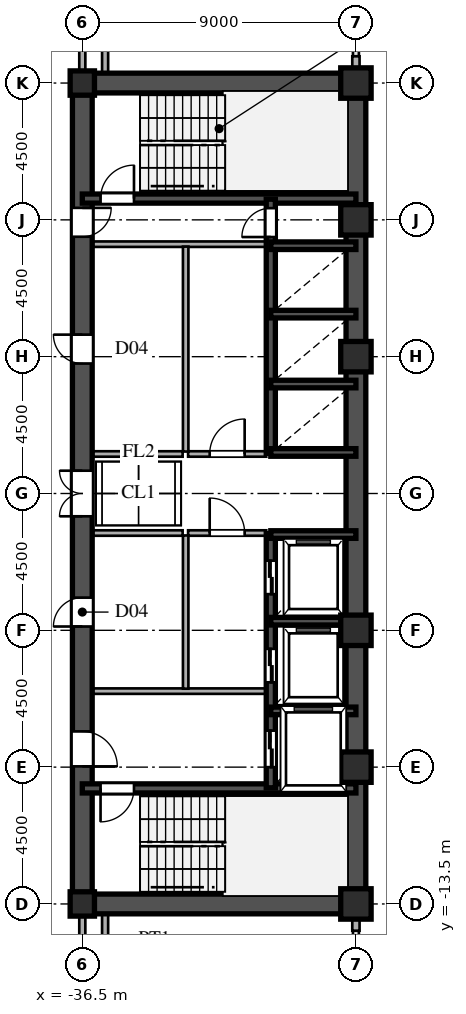
"""IFC4 building model, lengths in metres.
Left out: names, types, materials, properties, quantities, classifications, styles, units other than length and angle.
Written with IfcOpenShell. Run it as: python <this file> out.ifc"""

import sys

from ifc_helpers import new_model, si_unit, direction, frame, frame_2d, origin, origin_2d, place, context, subcontext, project, spatial, rectangle, hollow_rectangle, i_section, extrude, source, transform, mapped, element, fill, save


model = new_model("IFC4")
c1 = context("Model", 3, precision=1e-05, world=origin(), true_north=direction((0.0, 1.0)))
c2 = subcontext(c1, "Body", "Model", "MODEL_VIEW")
j1 = project(units=[si_unit("LENGTHUNIT", "METRE"), si_unit("PLANEANGLEUNIT", "RADIAN")], contexts=[c1])
p1 = place(None, origin())
s1 = spatial("IfcSite", under=j1, at=p1, CompositionType="ELEMENT")
p2 = place(p1, origin())
s2 = spatial("IfcBuilding", under=s1, at=p2, CompositionType="ELEMENT")
p3 = place(p2, frame((0.0, 0.0, 106.8)))
s3 = spatial("IfcBuildingStorey", under=s2, at=p3, CompositionType="ELEMENT", Elevation=106.8)
m1 = source(origin(), c2, "Body", "SweptSolid", [
    extrude(hollow_rectangle(XDim=1.0, YDim=1.0, WallThickness=0.042, at=origin_2d()), origin(), (0.0, 0.0, 1.0), 3.6),
])
for number, where, z_axis, x_axis in (
    (1, (-27.5, -13.5, 0.0), (0.0, 0.0, 1.0), (1.0, 0.0, 0.0)),
    (2, (-27.5, -9.0, 0.0), (0.0, 0.0, 1.0), (1.0, 0.0, 0.0)),
    (3, (-27.5, -4.5, 0.0), (0.0, 0.0, 1.0), (1.0, 0.0, 0.0)),
    (4, (-27.5, 4.5, 0.0), (0.0, 0.0, 1.0), (1.0, 0.0, 0.0)),
    (5, (-27.5, 9.0, 0.0), (0.0, 0.0, 1.0), (1.0, 0.0, 0.0)),
    (6, (-27.5, 13.5, 0.0), (0.0, 0.0, 1.0), (1.0, 0.0, 0.0)),
):
    element("IfcColumn", number, at=place(p3, frame(where, z_axis=z_axis, x_axis=x_axis)), inside=s3, PredefinedType="COLUMN", context=c2, shape_type="MappedRepresentation", body=[
        mapped(m1, transform((0.0, 0.0, 0.0), scale=1.0)),
    ])
m2 = source(origin(), c2, "Body", "SweptSolid", [
    extrude(i_section(OverallWidth=0.8, OverallDepth=0.8, WebThickness=0.032, FlangeThickness=0.05, at=origin_2d()), origin(), (0.0, 0.0, 1.0), 3.6),
])
for number, where, z_axis, x_axis in (
    (7, (-36.5, -13.5, 0.0), (0.0, 0.0, 1.0), (1.0, 0.0, 0.0)),
    (8, (-36.5, 13.5, 0.0), (0.0, 0.0, 1.0), (1.0, 0.0, 0.0)),
):
    element("IfcColumn", number, at=place(p3, frame(where, z_axis=z_axis, x_axis=x_axis)), inside=s3, PredefinedType="COLUMN", context=c2, shape_type="MappedRepresentation", body=[
        mapped(m2, transform((0.0, 0.0, 0.0), scale=1.0)),
    ])
for number, where, z_axis, x_axis in (
    (9, (-27.5, -14.38, 0.0), (0.0, 0.0, 1.0), (0.0, 1.0, 0.0)),
    (10, (-27.5, 13.83, 0.0), (0.0, 0.0, 1.0), (0.0, 1.0, 0.0)),
):
    element("IfcWall", number, at=place(p3, frame(where, z_axis=z_axis, x_axis=x_axis)), inside=s3, PredefinedType="SOLIDWALL", context=c2, shape_type="SweptSolid", body=[
        extrude(rectangle(XDim=0.55, YDim=0.24, at=frame_2d((0.275, 0.0))), origin(), (0.0, 0.0, 1.0), 1.88),
    ])
for number, where, z_axis, x_axis in (
    (11, (-27.5, -13.5, 0.0), (0.0, 0.0, 1.0), (0.0, 1.0, 0.0)),
    (12, (-27.5, 1.3, 0.0), (0.0, 0.0, 1.0), (0.0, 1.0, 0.0)),
):
    element("IfcWall", number, at=place(p3, frame(where, z_axis=z_axis, x_axis=x_axis)), inside=s3, PredefinedType="SHEAR", context=c2, shape_type="SweptSolid", body=[
        extrude(rectangle(XDim=12.2, YDim=0.65, at=frame_2d((6.1, 0.0))), origin(), (0.0, 0.0, 1.0), 3.38),
    ])
p4 = place(p3, frame((-27.5, -1.3, 0.0), z_axis=(0.0, 0.0, 1.0), x_axis=(0.0, 1.0, 0.0)))
e13 = element("IfcWall", 13, at=p4, inside=s3, PredefinedType="SHEAR", context=c2, shape_type="SweptSolid", body=[
    extrude(rectangle(XDim=2.6, YDim=0.65, at=frame_2d((1.3, 0.0))), origin(), (0.0, 0.0, 1.0), 3.38),
])
for number, where, z_axis, x_axis in (
    (14, (-36.5, -13.5, 0.0), (0.0, 0.0, 1.0), (1.0, 0.0, 0.0)),
    (15, (-36.5, 13.5, 0.0), (0.0, 0.0, 1.0), (1.0, 0.0, 0.0)),
):
    element("IfcWall", number, at=place(p3, frame(where, z_axis=z_axis, x_axis=x_axis)), inside=s3, PredefinedType="SHEAR", context=c2, shape_type="SweptSolid", body=[
        extrude(rectangle(XDim=9.0, YDim=0.65, at=frame_2d((4.5, 0.0))), origin(), (0.0, 0.0, 1.0), 3.38),
    ])
p5 = place(p3, frame((-36.5, -13.65, 0.0), z_axis=(0.0, 0.0, 1.0), x_axis=(0.0, 1.0, 0.0)))
e16 = element("IfcWall", 16, at=p5, inside=s3, PredefinedType="SHEAR", context=c2, shape_type="SweptSolid", body=[
    extrude(rectangle(XDim=7.15, YDim=0.65, at=frame_2d((3.575, 0.0))), origin(), (0.0, 0.0, 1.0), 3.38),
])
p6 = place(p5, frame((4.675, 0.0, 0.0)))
e17 = element("IfcOpeningElement", 17, at=p6, cuts=e16, PredefinedType="OPENING", context=c2, shape_type="SweptSolid", body=[
    extrude(rectangle(XDim=1.15, YDim=2.2, at=frame_2d((0.575, 1.1))), frame((0.0, 0.335, 0.0), z_axis=(0.0, -1.0, 0.0), x_axis=(1.0, 0.0, 0.0)), (0.0, 0.0, 1.0), 0.67),
])
p7 = place(p3, frame((-36.5, -1.3, 0.0), z_axis=(0.0, 0.0, 1.0), x_axis=(0.0, 1.0, 0.0)))
e18 = element("IfcWall", 18, at=p7, inside=s3, PredefinedType="SHEAR", context=c2, shape_type="SweptSolid", body=[
    extrude(rectangle(XDim=2.6, YDim=0.65, at=frame_2d((1.3, 0.0))), origin(), (0.0, 0.0, 1.0), 3.38),
])
p8 = place(p7, frame((0.55, 0.0, 0.0)))
e19 = element("IfcOpeningElement", 19, at=p8, cuts=e18, PredefinedType="OPENING", context=c2, shape_type="SweptSolid", body=[
    extrude(rectangle(XDim=1.5, YDim=2.3, at=frame_2d((0.75, 1.15))), frame((0.0, 0.335, 0.0), z_axis=(0.0, -1.0, 0.0), x_axis=(1.0, 0.0, 0.0)), (0.0, 0.0, 1.0), 0.67),
])
p9 = place(p3, frame((-36.5, 8.2, 0.0), z_axis=(0.0, 0.0, 1.0), x_axis=(0.0, 1.0, 0.0)))
e20 = element("IfcWall", 20, at=p9, inside=s3, PredefinedType="SHEAR", context=c2, shape_type="SweptSolid", body=[
    extrude(rectangle(XDim=5.45, YDim=0.65, at=frame_2d((2.725, 0.0))), origin(), (0.0, 0.0, 1.0), 3.38),
])
p10 = place(p9, frame((0.245, 0.0, 0.0)))
e21 = element("IfcOpeningElement", 21, at=p10, cuts=e20, PredefinedType="OPENING", context=c2, shape_type="SweptSolid", body=[
    extrude(rectangle(XDim=0.95, YDim=2.15, at=frame_2d((0.475, 1.075))), frame((0.0, 0.335, 0.0), z_axis=(0.0, -1.0, 0.0), x_axis=(1.0, 0.0, 0.0)), (0.0, 0.0, 1.0), 0.67),
])
p11 = place(p3, frame((-36.5, -6.5, 0.0), z_axis=(0.0, 0.0, 1.0), x_axis=(0.0, 1.0, 0.0)))
e22 = element("IfcWall", 22, at=p11, inside=s3, PredefinedType="SHEAR", context=c2, shape_type="SweptSolid", body=[
    extrude(rectangle(XDim=5.2, YDim=0.65, at=frame_2d((2.6, 0.0))), origin(), (0.0, 0.0, 1.0), 3.38),
])
p12 = place(p11, frame((2.125, 0.0, 0.0)))
e23 = element("IfcOpeningElement", 23, at=p12, cuts=e22, PredefinedType="OPENING", context=c2, shape_type="SweptSolid", body=[
    extrude(rectangle(XDim=0.95, YDim=2.15, at=frame_2d((0.475, 1.075))), frame((0.0, 0.335, 0.0), z_axis=(0.0, -1.0, 0.0), x_axis=(1.0, 0.0, 0.0)), (0.0, 0.0, 1.0), 0.67),
])
p13 = place(p3, frame((-36.5, 1.3, 0.0), z_axis=(0.0, 0.0, 1.0), x_axis=(0.0, 1.0, 0.0)))
e24 = element("IfcWall", 24, at=p13, inside=s3, PredefinedType="SHEAR", context=c2, shape_type="SweptSolid", body=[
    extrude(rectangle(XDim=6.9, YDim=0.65, at=frame_2d((3.45, 0.0))), origin(), (0.0, 0.0, 1.0), 3.38),
])
p14 = place(p13, frame((2.975, 0.0, 0.0)))
e25 = element("IfcOpeningElement", 25, at=p14, cuts=e24, PredefinedType="OPENING", context=c2, shape_type="SweptSolid", body=[
    extrude(rectangle(XDim=0.95, YDim=2.15, at=frame_2d((0.475, 1.075))), frame((0.0, 0.335, 0.0), z_axis=(0.0, -1.0, 0.0), x_axis=(1.0, 0.0, 0.0)), (0.0, 0.0, 1.0), 0.67),
])
p15 = place(p3, frame((-36.5, -9.7, 0.0), z_axis=(0.0, 0.0, 1.0), x_axis=(1.0, 0.0, 0.0)))
e26 = element("IfcWall", 26, at=p15, inside=s3, PredefinedType="SHEAR", context=c2, shape_type="SweptSolid", body=[
    extrude(rectangle(XDim=9.0, YDim=0.3, at=frame_2d((4.5, 0.0))), origin(), (0.0, 0.0, 1.0), 3.38),
])
p16 = place(p15, frame((0.6, 0.0, 0.0)))
e27 = element("IfcOpeningElement", 27, at=p16, cuts=e26, PredefinedType="OPENING", context=c2, shape_type="SweptSolid", body=[
    extrude(rectangle(XDim=1.1, YDim=2.2, at=frame_2d((0.55, 1.1))), frame((0.0, 0.16, 0.0), z_axis=(0.0, -1.0, 0.0), x_axis=(1.0, 0.0, 0.0)), (0.0, 0.0, 1.0), 0.32),
])
p17 = place(p3, frame((-36.5, 9.7, 0.0), z_axis=(0.0, 0.0, 1.0), x_axis=(1.0, 0.0, 0.0)))
e28 = element("IfcWall", 28, at=p17, inside=s3, PredefinedType="SHEAR", context=c2, shape_type="SweptSolid", body=[
    extrude(rectangle(XDim=9.0, YDim=0.3, at=frame_2d((4.5, 0.0))), origin(), (0.0, 0.0, 1.0), 3.38),
])
p18 = place(p17, frame((0.6, 0.0, 0.0)))
e29 = element("IfcOpeningElement", 29, at=p18, cuts=e28, PredefinedType="OPENING", context=c2, shape_type="SweptSolid", body=[
    extrude(rectangle(XDim=1.1, YDim=2.2, at=frame_2d((0.55, 1.1))), frame((0.0, 0.16, 0.0), z_axis=(0.0, -1.0, 0.0), x_axis=(1.0, 0.0, 0.0)), (0.0, 0.0, 1.0), 0.32),
])
for number, where, z_axis, x_axis in (
    (30, (-30.3, -7.15, 0.0), (0.0, 0.0, 1.0), (1.0, 0.0, 0.0)),
    (31, (-30.3, -4.2, 0.0), (0.0, 0.0, 1.0), (1.0, 0.0, 0.0)),
    (32, (-30.3, -1.35, 0.0), (0.0, 0.0, 1.0), (1.0, 0.0, 0.0)),
    (33, (-30.3, 1.35, 0.0), (0.0, 0.0, 1.0), (1.0, 0.0, 0.0)),
    (34, (-30.3, 3.6, 0.0), (0.0, 0.0, 1.0), (1.0, 0.0, 0.0)),
    (35, (-30.3, 5.9, 0.0), (0.0, 0.0, 1.0), (1.0, 0.0, 0.0)),
    (36, (-30.3, 8.15, 0.0), (0.0, 0.0, 1.0), (1.0, 0.0, 0.0)),
):
    element("IfcWall", number, at=place(p3, frame(where, z_axis=z_axis, x_axis=x_axis)), inside=s3, PredefinedType="SHEAR", context=c2, shape_type="SweptSolid", body=[
        extrude(rectangle(XDim=2.8, YDim=0.25, at=frame_2d((1.4, 0.0))), origin(), (0.0, 0.0, 1.0), 3.38),
    ])
p19 = place(p3, frame((-30.3, -9.68, 0.0), z_axis=(0.0, 0.0, 1.0), x_axis=(0.0, 1.0, 0.0)))
e37 = element("IfcWall", 37, at=p19, inside=s3, PredefinedType="SHEAR", context=c2, shape_type="SweptSolid", body=[
    extrude(rectangle(XDim=2.56, YDim=0.3, at=frame_2d((1.28, 0.0))), origin(), (0.0, 0.0, 1.0), 3.38),
])
p20 = place(p19, frame((0.68, 0.0, 0.0)))
e38 = element("IfcOpeningElement", 38, at=p20, cuts=e37, PredefinedType="OPENING", context=c2, shape_type="SweptSolid", body=[
    extrude(rectangle(XDim=1.2, YDim=2.25, at=frame_2d((0.6, 1.125))), frame((0.0, 0.16, 0.0), z_axis=(0.0, -1.0, 0.0), x_axis=(1.0, 0.0, 0.0)), (0.0, 0.0, 1.0), 0.32),
])
p21 = place(p3, frame((-30.3, -7.12, 0.0), z_axis=(0.0, 0.0, 1.0), x_axis=(0.0, 1.0, 0.0)))
e39 = element("IfcWall", 39, at=p21, inside=s3, PredefinedType="SHEAR", context=c2, shape_type="SweptSolid", body=[
    extrude(rectangle(XDim=2.92, YDim=0.3, at=frame_2d((1.46, 0.0))), origin(), (0.0, 0.0, 1.0), 3.38),
])
p22 = place(p21, frame((0.91, 0.0, 0.0)))
e40 = element("IfcOpeningElement", 40, at=p22, cuts=e39, PredefinedType="OPENING", context=c2, shape_type="SweptSolid", body=[
    extrude(rectangle(XDim=1.1, YDim=2.2, at=frame_2d((0.55, 1.1))), frame((0.0, 0.16, 0.0), z_axis=(0.0, -1.0, 0.0), x_axis=(1.0, 0.0, 0.0)), (0.0, 0.0, 1.0), 0.32),
])
p23 = place(p3, frame((-30.3, -4.2, 0.0), z_axis=(0.0, 0.0, 1.0), x_axis=(0.0, 1.0, 0.0)))
e41 = element("IfcWall", 41, at=p23, inside=s3, PredefinedType="SHEAR", context=c2, shape_type="SweptSolid", body=[
    extrude(rectangle(XDim=2.88, YDim=0.3, at=frame_2d((1.44, 0.0))), origin(), (0.0, 0.0, 1.0), 3.38),
])
p24 = place(p23, frame((0.89, 0.0, 0.0)))
e42 = element("IfcOpeningElement", 42, at=p24, cuts=e41, PredefinedType="OPENING", context=c2, shape_type="SweptSolid", body=[
    extrude(rectangle(XDim=1.1, YDim=2.2, at=frame_2d((0.55, 1.1))), frame((0.0, 0.16, 0.0), z_axis=(0.0, -1.0, 0.0), x_axis=(1.0, 0.0, 0.0)), (0.0, 0.0, 1.0), 0.32),
])
p25 = place(p3, frame((-30.3, 1.32, 0.0), z_axis=(0.0, 0.0, 1.0), x_axis=(0.0, 1.0, 0.0)))
e43 = element("IfcWall", 43, at=p25, inside=s3, PredefinedType="SHEAR", context=c2, shape_type="SweptSolid", body=[
    extrude(rectangle(XDim=2.28, YDim=0.3, at=frame_2d((1.14, 0.0))), origin(), (0.0, 0.0, 1.0), 3.38),
])
p26 = place(p3, frame((-30.3, 3.6, 0.0), z_axis=(0.0, 0.0, 1.0), x_axis=(0.0, 1.0, 0.0)))
e44 = element("IfcWall", 44, at=p26, inside=s3, PredefinedType="SHEAR", context=c2, shape_type="SweptSolid", body=[
    extrude(rectangle(XDim=2.3, YDim=0.3, at=frame_2d((1.15, 0.0))), origin(), (0.0, 0.0, 1.0), 3.38),
])
p27 = place(p3, frame((-30.3, 5.9, 0.0), z_axis=(0.0, 0.0, 1.0), x_axis=(0.0, 1.0, 0.0)))
e45 = element("IfcWall", 45, at=p27, inside=s3, PredefinedType="SHEAR", context=c2, shape_type="SweptSolid", body=[
    extrude(rectangle(XDim=2.25, YDim=0.3, at=frame_2d((1.125, 0.0))), origin(), (0.0, 0.0, 1.0), 3.38),
])
p28 = place(p3, frame((-30.3, 8.15, 0.0), z_axis=(0.0, 0.0, 1.0), x_axis=(0.0, 1.0, 0.0)))
e46 = element("IfcWall", 46, at=p28, inside=s3, PredefinedType="SHEAR", context=c2, shape_type="SweptSolid", body=[
    extrude(rectangle(XDim=1.53, YDim=0.3, at=frame_2d((0.765, 0.0))), origin(), (0.0, 0.0, 1.0), 3.38),
])
p29 = place(p28, frame((0.285, 0.0, 0.0)))
e47 = element("IfcOpeningElement", 47, at=p29, cuts=e46, PredefinedType="OPENING", context=c2, shape_type="SweptSolid", body=[
    extrude(rectangle(XDim=0.95, YDim=2.15, at=frame_2d((0.475, 1.075))), frame((0.0, 0.16, 0.0), z_axis=(0.0, -1.0, 0.0), x_axis=(1.0, 0.0, 0.0)), (0.0, 0.0, 1.0), 0.32),
])
for number, where, z_axis, x_axis in (
    (48, (-36.15, -6.5, 0.0), (0.0, 0.0, 1.0), (1.0, 0.0, 0.0)),
    (49, (-36.15, 8.2, 0.0), (0.0, 0.0, 1.0), (1.0, 0.0, 0.0)),
):
    element("IfcWall", number, at=place(p3, frame(where, z_axis=z_axis, x_axis=x_axis)), inside=s3, PredefinedType="PARTITIONING", context=c2, shape_type="SweptSolid", body=[
        extrude(rectangle(XDim=5.7, YDim=0.18, at=frame_2d((2.85, 0.0))), origin(), (0.0, 0.0, 1.0), 3.38),
    ])
p30 = place(p3, frame((-33.1, -6.42, 0.0), z_axis=(0.0, 0.0, 1.0), x_axis=(0.0, 1.0, 0.0)))
e50 = element("IfcWall", 50, at=p30, inside=s3, PredefinedType="PARTITIONING", context=c2, shape_type="SweptSolid", body=[
    extrude(rectangle(XDim=5.04, YDim=0.18, at=frame_2d((2.52, 0.0))), origin(), (0.0, 0.0, 1.0), 3.38),
])
p31 = place(p3, frame((-33.1, 1.38, 0.0), z_axis=(0.0, 0.0, 1.0), x_axis=(0.0, 1.0, 0.0)))
e51 = element("IfcWall", 51, at=p31, inside=s3, PredefinedType="PARTITIONING", context=c2, shape_type="SweptSolid", body=[
    extrude(rectangle(XDim=6.74, YDim=0.18, at=frame_2d((3.37, 0.0))), origin(), (0.0, 0.0, 1.0), 3.38),
])
p32 = place(p3, frame((-33.02, -1.3, 0.0), z_axis=(0.0, 0.0, 1.0), x_axis=(1.0, 0.0, 0.0)))
e52 = element("IfcWall", 52, at=p32, inside=s3, PredefinedType="PARTITIONING", context=c2, shape_type="SweptSolid", body=[
    extrude(rectangle(XDim=2.57, YDim=0.18, at=frame_2d((1.285, 0.0))), origin(), (0.0, 0.0, 1.0), 3.38),
])
p33 = place(p32, frame((0.71, 0.0, 0.0)))
e53 = element("IfcOpeningElement", 53, at=p33, cuts=e52, PredefinedType="OPENING", context=c2, shape_type="SweptSolid", body=[
    extrude(rectangle(XDim=1.15, YDim=2.2, at=frame_2d((0.575, 1.1))), frame((0.0, 0.1, 0.0), z_axis=(0.0, -1.0, 0.0), x_axis=(1.0, 0.0, 0.0)), (0.0, 0.0, 1.0), 0.2),
])
p34 = place(p3, frame((-33.02, 1.3, 0.0), z_axis=(0.0, 0.0, 1.0), x_axis=(1.0, 0.0, 0.0)))
e54 = element("IfcWall", 54, at=p34, inside=s3, PredefinedType="PARTITIONING", context=c2, shape_type="SweptSolid", body=[
    extrude(rectangle(XDim=2.57, YDim=0.18, at=frame_2d((1.285, 0.0))), origin(), (0.0, 0.0, 1.0), 3.38),
])
p35 = place(p34, frame((0.71, 0.0, 0.0)))
e55 = element("IfcOpeningElement", 55, at=p35, cuts=e54, PredefinedType="OPENING", context=c2, shape_type="SweptSolid", body=[
    extrude(rectangle(XDim=1.15, YDim=2.2, at=frame_2d((0.575, 1.1))), frame((0.0, 0.1, 0.0), z_axis=(0.0, -1.0, 0.0), x_axis=(1.0, 0.0, 0.0)), (0.0, 0.0, 1.0), 0.2),
])
for number, where, z_axis, x_axis in (
    (56, (-36.15, -1.3, 0.0), (0.0, 0.0, 1.0), (1.0, 0.0, 0.0)),
    (57, (-36.15, 1.3, 0.0), (0.0, 0.0, 1.0), (1.0, 0.0, 0.0)),
):
    element("IfcWall", number, at=place(p3, frame(where, z_axis=z_axis, x_axis=x_axis)), inside=s3, PredefinedType="PARTITIONING", context=c2, shape_type="SweptSolid", body=[
        extrude(rectangle(XDim=2.95, YDim=0.18, at=frame_2d((1.475, 0.0))), origin(), (0.0, 0.0, 1.0), 3.38),
    ])
for number, where, z_axis, x_axis in (
    (58, (-36.5, -15.515, 0.0), (0.0, 0.0, 1.0), (0.0, 1.0, 0.0)),
    (59, (-36.5, 13.83, 0.0), (0.0, 0.0, 1.0), (0.0, 1.0, 0.0)),
):
    element("IfcWall", number, at=place(p3, frame(where, z_axis=z_axis, x_axis=x_axis)), inside=s3, PredefinedType="PARTITIONING", context=c2, shape_type="SweptSolid", body=[
        extrude(rectangle(XDim=1.685, YDim=0.2, at=frame_2d((0.842, 0.0))), origin(), (0.0, 0.0, 1.0), 1.38),
    ])
for number, where, z_axis, x_axis in (
    (60, (-35.75, -18.515, 0.0), (0.0, 0.0, 1.0), (0.0, 1.0, 0.0)),
    (61, (-35.75, 13.83, 0.0), (0.0, 0.0, 1.0), (0.0, 1.0, 0.0)),
):
    element("IfcWall", number, at=place(p3, frame(where, z_axis=z_axis, x_axis=x_axis)), inside=s3, PredefinedType="PARTITIONING", context=c2, shape_type="SweptSolid", body=[
        extrude(rectangle(XDim=4.685, YDim=0.2, at=frame_2d((2.342, 0.0))), origin(), (0.0, 0.0, 1.0), 3.38),
    ])
m3 = source(origin(), c2, "Body", "SweptSolid", [
    extrude(rectangle(XDim=1.15, YDim=2.2, at=frame_2d((0.575, 1.1))), frame((0.0, 0.025, 0.0), z_axis=(0.0, -1.0, 0.0), x_axis=(1.0, 0.0, 0.0)), (0.0, 0.0, 1.0), 0.05),
])
p36 = place(p6, frame((1.15, 0.0, 0.0), z_axis=(0.0, 0.0, 1.0), x_axis=(-1.0, 0.0, 0.0)))
e62 = element("IfcDoor", 62, at=p36, inside=s3, OperationType="SINGLE_SWING_LEFT", PredefinedType="DOOR", context=c2, shape_type="MappedRepresentation", body=[
    mapped(m3, transform((0.0, 0.0, 0.0), scale=1.0)),
])
fill(e17, e62)
m4 = source(origin(), c2, "Body", "SweptSolid", [
    extrude(rectangle(XDim=1.5, YDim=2.3, at=frame_2d((0.75, 1.15))), frame((0.0, 0.025, 0.0), z_axis=(0.0, -1.0, 0.0), x_axis=(1.0, 0.0, 0.0)), (0.0, 0.0, 1.0), 0.05),
])
p37 = place(p8, origin())
e63 = element("IfcDoor", 63, at=p37, inside=s3, OperationType="DOUBLE_SWING_LEFT", PredefinedType="DOOR", context=c2, shape_type="MappedRepresentation", body=[
    mapped(m4, transform((0.0, 0.0, 0.0), scale=1.0)),
])
fill(e19, e63)
m5 = source(origin(), c2, "Body", "SweptSolid", [
    extrude(rectangle(XDim=0.95, YDim=2.15, at=frame_2d((0.475, 1.075))), frame((0.0, 0.025, 0.0), z_axis=(0.0, -1.0, 0.0), x_axis=(1.0, 0.0, 0.0)), (0.0, 0.0, 1.0), 0.05),
])
p38 = place(p10, frame((0.95, 0.0, 0.0), z_axis=(0.0, 0.0, 1.0), x_axis=(-1.0, 0.0, 0.0)))
e64 = element("IfcDoor", 64, at=p38, inside=s3, OperationType="SINGLE_SWING_RIGHT", PredefinedType="DOOR", context=c2, shape_type="MappedRepresentation", body=[
    mapped(m5, transform((0.0, 0.0, 0.0), scale=1.0)),
])
fill(e21, e64)
p39 = place(p12, origin())
e65 = element("IfcDoor", 65, at=p39, inside=s3, OperationType="SINGLE_SWING_LEFT", PredefinedType="DOOR", context=c2, shape_type="MappedRepresentation", body=[
    mapped(m5, transform((0.0, 0.0, 0.0), scale=1.0)),
])
fill(e23, e65)
p40 = place(p14, origin())
e66 = element("IfcDoor", 66, at=p40, inside=s3, OperationType="SINGLE_SWING_RIGHT", PredefinedType="DOOR", context=c2, shape_type="MappedRepresentation", body=[
    mapped(m5, transform((0.0, 0.0, 0.0), scale=1.0)),
])
fill(e25, e66)
m6 = source(origin(), c2, "Body", "SweptSolid", [
    extrude(rectangle(XDim=1.1, YDim=2.2, at=frame_2d((0.55, 1.1))), frame((0.0, 0.025, 0.0), z_axis=(0.0, -1.0, 0.0), x_axis=(1.0, 0.0, 0.0)), (0.0, 0.0, 1.0), 0.05),
])
p41 = place(p16, frame((1.1, 0.0, 0.0), z_axis=(0.0, 0.0, 1.0), x_axis=(-1.0, 0.0, 0.0)))
e67 = element("IfcDoor", 67, at=p41, inside=s3, OperationType="SINGLE_SWING_LEFT", PredefinedType="DOOR", context=c2, shape_type="MappedRepresentation", body=[
    mapped(m6, transform((0.0, 0.0, 0.0), scale=1.0)),
])
fill(e27, e67)
p42 = place(p18, origin())
e68 = element("IfcDoor", 68, at=p42, inside=s3, OperationType="SINGLE_SWING_RIGHT", PredefinedType="DOOR", context=c2, shape_type="MappedRepresentation", body=[
    mapped(m6, transform((0.0, 0.0, 0.0), scale=1.0)),
])
fill(e29, e68)
m7 = source(origin(), c2, "Body", "SweptSolid", [
    extrude(rectangle(XDim=1.2, YDim=2.25, at=frame_2d((0.6, 1.125))), frame((0.0, 0.025, 0.0), z_axis=(0.0, -1.0, 0.0), x_axis=(1.0, 0.0, 0.0)), (0.0, 0.0, 1.0), 0.05),
])
p43 = place(p20, origin())
e69 = element("IfcDoor", 69, at=p43, inside=s3, OperationType="DOUBLE_DOOR_SLIDING", PredefinedType="DOOR", context=c2, shape_type="MappedRepresentation", body=[
    mapped(m7, transform((0.0, 0.0, 0.0), scale=1.0)),
])
fill(e38, e69)
m8 = source(origin(), c2, "Body", "SweptSolid", [
    extrude(rectangle(XDim=1.1, YDim=2.2, at=frame_2d((0.55, 1.1))), frame((0.0, 0.025, 0.0), z_axis=(0.0, -1.0, 0.0), x_axis=(1.0, 0.0, 0.0)), (0.0, 0.0, 1.0), 0.05),
])
p44 = place(p22, origin())
e70 = element("IfcDoor", 70, at=p44, inside=s3, OperationType="DOUBLE_DOOR_SLIDING", PredefinedType="DOOR", context=c2, shape_type="MappedRepresentation", body=[
    mapped(m8, transform((0.0, 0.0, 0.0), scale=1.0)),
])
fill(e40, e70)
p45 = place(p24, origin())
e71 = element("IfcDoor", 71, at=p45, inside=s3, OperationType="DOUBLE_DOOR_SLIDING", PredefinedType="DOOR", context=c2, shape_type="MappedRepresentation", body=[
    mapped(m8, transform((0.0, 0.0, 0.0), scale=1.0)),
])
fill(e42, e71)
p46 = place(p29, origin())
e72 = element("IfcDoor", 72, at=p46, inside=s3, OperationType="SINGLE_SWING_LEFT", PredefinedType="DOOR", context=c2, shape_type="MappedRepresentation", body=[
    mapped(m5, transform((0.0, 0.0, 0.0), scale=1.0)),
])
fill(e47, e72)
p47 = place(p33, origin())
e73 = element("IfcDoor", 73, at=p47, inside=s3, OperationType="SINGLE_SWING_LEFT", PredefinedType="DOOR", context=c2, shape_type="MappedRepresentation", body=[
    mapped(m3, transform((0.0, 0.0, 0.0), scale=1.0)),
])
fill(e53, e73)
p48 = place(p35, origin())
e74 = element("IfcDoor", 74, at=p48, inside=s3, OperationType="SINGLE_SWING_RIGHT", PredefinedType="DOOR", context=c2, shape_type="MappedRepresentation", body=[
    mapped(m3, transform((0.0, 0.0, 0.0), scale=1.0)),
])
fill(e55, e74)
save(model, sys.argv[1])
